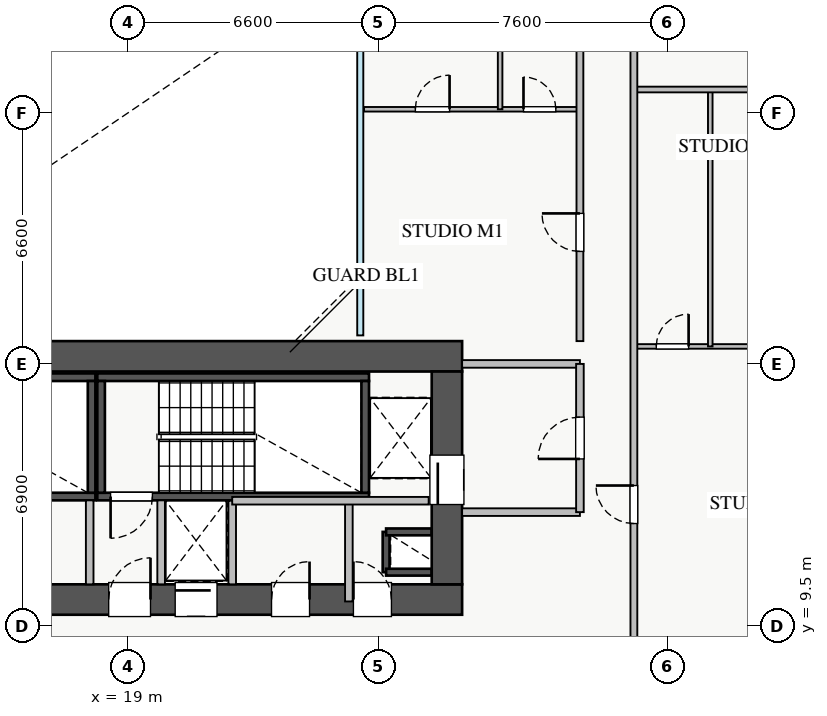
"""IFC4 building model, lengths in metres.
Left out: names, types, materials, properties, quantities, classifications, styles, units other than length and angle.
Written with IfcOpenShell. Run it as: python <this file> out.ifc"""

import sys

from ifc_helpers import new_model, si_unit, direction, frame, frame_2d, origin, place, context, subcontext, project, spatial, rectangle, extrude, source, transform, mapped, element, fill, save


model = new_model("IFC4")
c1 = context("Model", 3, precision=1e-05, world=origin(), true_north=direction((0.0, 1.0)))
c2 = subcontext(c1, "Body", "Model", "MODEL_VIEW")
j1 = project(units=[si_unit("LENGTHUNIT", "METRE"), si_unit("PLANEANGLEUNIT", "RADIAN")], contexts=[c1])
p1 = place(None, origin())
s1 = spatial("IfcSite", under=j1, at=p1, CompositionType="ELEMENT")
p2 = place(p1, origin())
s2 = spatial("IfcBuilding", under=s1, at=p2, CompositionType="ELEMENT")
p3 = place(p2, frame((0.0, 0.0, 69.75)))
s3 = spatial("IfcBuildingStorey", under=s2, at=p3, CompositionType="ELEMENT", Elevation=69.75)
p4 = place(p3, frame((25.8, 10.92, 0.0), z_axis=(0.0, 0.0, 1.0), x_axis=(0.0, 1.0, 0.0)))
e1 = element("IfcWall", 1, at=p4, inside=s3, PredefinedType="SHEAR", context=c2, shape_type="SweptSolid", body=[
    extrude(rectangle(XDim=1.06, YDim=0.18, at=frame_2d((0.53, 0.0))), origin(), (0.0, 0.0, 1.0), 3.07),
])
for number, where, z_axis, x_axis in (
    (2, (25.8, 11.98, 0.0), (0.0, 0.0, 1.0), (1.0, 0.0, 0.0)),
    (3, (25.8, 10.92, 0.0), (0.0, 0.0, 1.0), (1.0, 0.0, 0.0)),
):
    element("IfcWall", number, at=place(p3, frame(where, z_axis=z_axis, x_axis=x_axis)), inside=s3, PredefinedType="SHEAR", context=c2, shape_type="SweptSolid", body=[
        extrude(rectangle(XDim=1.2, YDim=0.18, at=frame_2d((0.6, 0.0))), origin(), (0.0, 0.0, 1.0), 3.07),
    ])
p5 = place(p3, frame((19.88, 12.8, 0.0), z_axis=(0.0, 0.0, 1.0), x_axis=(1.0, 0.0, 0.0)))
e4 = element("IfcWall", 4, at=p5, inside=s3, PredefinedType="SHEAR", context=c2, shape_type="SweptSolid", body=[
    extrude(rectangle(XDim=1.87, YDim=0.18, at=frame_2d((0.935, 0.0))), origin(), (0.0, 0.0, 1.0), 3.07),
])
p6 = place(p3, frame((11.0, 12.91, 0.0), z_axis=(0.0, 0.0, 1.0), x_axis=(1.0, 0.0, 0.0)))
e5 = element("IfcWall", 5, at=p6, inside=s3, PredefinedType="SHEAR", context=c2, shape_type="SweptSolid", body=[
    extrude(rectangle(XDim=7.15, YDim=0.2, at=frame_2d((3.575, 0.0))), origin(), (0.0, 0.0, 1.0), 3.25),
])
p7 = place(p6, frame((0.35, 0.0, 0.0)))
e6 = element("IfcOpeningElement", 6, at=p7, cuts=e5, PredefinedType="OPENING", context=c2, shape_type="SweptSolid", body=[
    extrude(rectangle(XDim=1.1, YDim=2.05, at=frame_2d((0.55, 1.025))), frame((0.0, 0.11, 0.0), z_axis=(0.0, -1.0, 0.0), x_axis=(1.0, 0.0, 0.0)), (0.0, 0.0, 1.0), 0.22),
])
p8 = place(p3, frame((11.0, 16.05, 0.0), z_axis=(0.0, 0.0, 1.0), x_axis=(1.0, 0.0, 0.0)))
e7 = element("IfcWall", 7, at=p8, inside=s3, PredefinedType="SHEAR", context=c2, shape_type="SweptSolid", body=[
    extrude(rectangle(XDim=7.15, YDim=0.2, at=frame_2d((3.575, 0.0))), origin(), (0.0, 0.0, 1.0), 3.25),
])
p9 = place(p3, frame((18.05, 13.01, 0.0), z_axis=(0.0, 0.0, 1.0), x_axis=(0.0, 1.0, 0.0)))
e8 = element("IfcWall", 8, at=p9, inside=s3, PredefinedType="SHEAR", context=c2, shape_type="SweptSolid", body=[
    extrude(rectangle(XDim=2.94, YDim=0.2, at=frame_2d((1.47, 0.0))), origin(), (0.0, 0.0, 1.0), 3.25),
])
p10 = place(p3, frame((18.2, 12.91, 0.0), z_axis=(0.0, 0.0, 1.0), x_axis=(1.0, 0.0, 0.0)))
e9 = element("IfcWall", 9, at=p10, inside=s3, PredefinedType="SHEAR", context=c2, shape_type="SweptSolid", body=[
    extrude(rectangle(XDim=7.15, YDim=0.2, at=frame_2d((3.575, 0.0))), origin(), (0.0, 0.0, 1.0), 3.25),
])
p11 = place(p10, frame((0.35, 0.0, 0.0)))
e10 = element("IfcOpeningElement", 10, at=p11, cuts=e9, PredefinedType="OPENING", context=c2, shape_type="SweptSolid", body=[
    extrude(rectangle(XDim=1.1, YDim=2.05, at=frame_2d((0.55, 1.025))), frame((0.0, 0.11, 0.0), z_axis=(0.0, -1.0, 0.0), x_axis=(1.0, 0.0, 0.0)), (0.0, 0.0, 1.0), 0.22),
])
p12 = place(p3, frame((18.2, 16.05, 0.0), z_axis=(0.0, 0.0, 1.0), x_axis=(1.0, 0.0, 0.0)))
e11 = element("IfcWall", 11, at=p12, inside=s3, PredefinedType="SHEAR", context=c2, shape_type="SweptSolid", body=[
    extrude(rectangle(XDim=7.15, YDim=0.2, at=frame_2d((3.575, 0.0))), origin(), (0.0, 0.0, 1.0), 3.25),
])
for number, where, z_axis, x_axis in (
    (12, (18.3, 13.01, 0.0), (0.0, 0.0, 1.0), (0.0, 1.0, 0.0)),
    (13, (25.25, 13.01, 0.0), (0.0, 0.0, 1.0), (0.0, 1.0, 0.0)),
):
    element("IfcWall", number, at=place(p3, frame(where, z_axis=z_axis, x_axis=x_axis)), inside=s3, PredefinedType="SHEAR", context=c2, shape_type="SweptSolid", body=[
        extrude(rectangle(XDim=2.94, YDim=0.2, at=frame_2d((1.47, 0.0))), origin(), (0.0, 0.0, 1.0), 3.25),
    ])
p13 = place(p3, frame((10.2, 10.2, 0.0), z_axis=(0.0, 0.0, 1.0), x_axis=(1.0, 0.0, 0.0)))
e14 = element("IfcWall", 14, at=p13, inside=s3, PredefinedType="SHEAR", context=c2, shape_type="SweptSolid", body=[
    extrude(rectangle(XDim=17.6, YDim=0.8, at=frame_2d((8.8, 0.0))), origin(), (0.0, 0.0, 1.0), 3.25),
])
p14 = place(p13, frame((1.15, 0.0, 0.0)))
e15 = element("IfcOpeningElement", 15, at=p14, cuts=e14, PredefinedType="OPENING", context=c2, shape_type="SweptSolid", body=[
    extrude(rectangle(XDim=1.1, YDim=2.05, at=frame_2d((0.55, 1.025))), frame((0.0, 0.41, 0.0), z_axis=(0.0, -1.0, 0.0), x_axis=(1.0, 0.0, 0.0)), (0.0, 0.0, 1.0), 0.82),
])
p15 = place(p13, frame((8.3, 0.0, 0.0)))
e16 = element("IfcOpeningElement", 16, at=p15, cuts=e14, PredefinedType="OPENING", context=c2, shape_type="SweptSolid", body=[
    extrude(rectangle(XDim=1.1, YDim=2.05, at=frame_2d((0.55, 1.025))), frame((0.0, 0.41, 0.0), z_axis=(0.0, -1.0, 0.0), x_axis=(1.0, 0.0, 0.0)), (0.0, 0.0, 1.0), 0.82),
])
p16 = place(p13, frame((10.05, 0.0, 0.0)))
e17 = element("IfcOpeningElement", 17, at=p16, cuts=e14, PredefinedType="OPENING", context=c2, shape_type="SweptSolid", body=[
    extrude(rectangle(XDim=1.1, YDim=2.05, at=frame_2d((0.55, 1.025))), frame((0.0, 0.41, 0.0), z_axis=(0.0, -1.0, 0.0), x_axis=(1.0, 0.0, 0.0)), (0.0, 0.0, 1.0), 0.82),
])
p17 = place(p13, frame((14.74, 0.0, 0.0)))
e18 = element("IfcOpeningElement", 18, at=p17, cuts=e14, PredefinedType="OPENING", context=c2, shape_type="SweptSolid", body=[
    extrude(rectangle(XDim=1.0, YDim=2.05, at=frame_2d((0.5, 1.025))), frame((0.0, 0.41, 0.0), z_axis=(0.0, -1.0, 0.0), x_axis=(1.0, 0.0, 0.0)), (0.0, 0.0, 1.0), 0.82),
])
p18 = place(p13, frame((12.585, 0.0, 0.0)))
e19 = element("IfcOpeningElement", 19, at=p18, cuts=e14, PredefinedType="OPENING", context=c2, shape_type="SweptSolid", body=[
    extrude(rectangle(XDim=1.0, YDim=2.05, at=frame_2d((0.5, 1.025))), frame((0.0, 0.41, 0.0), z_axis=(0.0, -1.0, 0.0), x_axis=(1.0, 0.0, 0.0)), (0.0, 0.0, 1.0), 0.82),
])
p19 = place(p3, frame((10.2, 16.6, 0.0), z_axis=(0.0, 0.0, 1.0), x_axis=(1.0, 0.0, 0.0)))
e20 = element("IfcWall", 20, at=p19, inside=s3, PredefinedType="SHEAR", context=c2, shape_type="SweptSolid", body=[
    extrude(rectangle(XDim=17.6, YDim=0.8, at=frame_2d((8.8, 0.0))), origin(), (0.0, 0.0, 1.0), 3.25),
])
p20 = place(p3, frame((27.4, 10.6, 0.0), z_axis=(0.0, 0.0, 1.0), x_axis=(0.0, 1.0, 0.0)))
e21 = element("IfcWall", 21, at=p20, inside=s3, PredefinedType="SHEAR", context=c2, shape_type="SweptSolid", body=[
    extrude(rectangle(XDim=5.6, YDim=0.8, at=frame_2d((2.8, 0.0))), origin(), (0.0, 0.0, 1.0), 3.25),
])
p21 = place(p20, frame((2.1, 0.0, 0.0)))
e22 = element("IfcOpeningElement", 22, at=p21, cuts=e21, PredefinedType="OPENING", context=c2, shape_type="SweptSolid", body=[
    extrude(rectangle(XDim=1.3, YDim=2.05, at=frame_2d((0.65, 1.025))), frame((0.0, 0.41, 0.0), z_axis=(0.0, -1.0, 0.0), x_axis=(1.0, 0.0, 0.0)), (0.0, 0.0, 1.0), 0.82),
])
for number, where, z_axis, x_axis in (
    (23, (27.8, 16.4, 0.0), (0.0, 0.0, 1.0), (1.0, 0.0, 0.0)),
    (24, (27.8, 12.5, 0.0), (0.0, 0.0, 1.0), (1.0, 0.0, 0.0)),
):
    element("IfcWall", number, at=place(p3, frame(where, z_axis=z_axis, x_axis=x_axis)), inside=s3, PredefinedType="PARTITIONING", context=c2, shape_type="SweptSolid", body=[
        extrude(rectangle(XDim=3.1, YDim=0.2, at=frame_2d((1.55, 0.0))), origin(), (0.0, 0.0, 1.0), 3.07),
    ])
p22 = place(p3, frame((30.9, 12.5, 0.0), z_axis=(0.0, 0.0, 1.0), x_axis=(0.0, 1.0, 0.0)))
e25 = element("IfcWall", 25, at=p22, inside=s3, PredefinedType="PARTITIONING", context=c2, shape_type="SweptSolid", body=[
    extrude(rectangle(XDim=3.9, YDim=0.2, at=frame_2d((1.95, 0.0))), origin(), (0.0, 0.0, 1.0), 3.07),
])
p23 = place(p22, frame((1.4, 0.0, 0.0)))
e26 = element("IfcOpeningElement", 26, at=p23, cuts=e25, PredefinedType="OPENING", context=c2, shape_type="SweptSolid", body=[
    extrude(rectangle(XDim=1.1, YDim=2.05, at=frame_2d((0.55, 1.025))), frame((0.0, 0.11, 0.0), z_axis=(0.0, -1.0, 0.0), x_axis=(1.0, 0.0, 0.0)), (0.0, 0.0, 1.0), 0.22),
])
for number, where, z_axis, x_axis in (
    (27, (18.0, 10.6, 0.0), (0.0, 0.0, 1.0), (0.0, 1.0, 0.0)),
    (28, (19.88, 10.6, 0.0), (0.0, 0.0, 1.0), (0.0, 1.0, 0.0)),
):
    element("IfcWall", number, at=place(p3, frame(where, z_axis=z_axis, x_axis=x_axis)), inside=s3, PredefinedType="PARTITIONING", context=c2, shape_type="SweptSolid", body=[
        extrude(rectangle(XDim=2.21, YDim=0.2, at=frame_2d((1.105, 0.0))), origin(), (0.0, 0.0, 1.0), 3.07),
    ])
p24 = place(p3, frame((24.82, 10.15, 0.0), z_axis=(0.0, 0.0, 1.0), x_axis=(0.0, 1.0, 0.0)))
e29 = element("IfcWall", 29, at=p24, inside=s3, PredefinedType="PARTITIONING", context=c2, shape_type="SweptSolid", body=[
    extrude(rectangle(XDim=2.65, YDim=0.2, at=frame_2d((1.325, 0.0))), origin(), (0.0, 0.0, 1.0), 3.07),
])
p25 = place(p3, frame((21.75, 10.6, 0.0), z_axis=(0.0, 0.0, 1.0), x_axis=(0.0, 1.0, 0.0)))
e30 = element("IfcWall", 30, at=p25, inside=s3, PredefinedType="PARTITIONING", context=c2, shape_type="SweptSolid", body=[
    extrude(rectangle(XDim=2.2, YDim=0.2, at=frame_2d((1.1, 0.0))), origin(), (0.0, 0.0, 1.0), 3.07),
])
p26 = place(p3, frame((21.75, 12.8, 0.0), z_axis=(0.0, 0.0, 1.0), x_axis=(1.0, 0.0, 0.0)))
e31 = element("IfcWall", 31, at=p26, inside=s3, PredefinedType="PARTITIONING", context=c2, shape_type="SweptSolid", body=[
    extrude(rectangle(XDim=5.17, YDim=0.2, at=frame_2d((2.585, 0.0))), origin(), (0.0, 0.0, 1.0), 3.07),
])
p27 = place(p3, frame((32.32, 16.86, 0.0), z_axis=(0.0, 0.0, 1.0), x_axis=(1.0, 0.0, 0.0)))
e32 = element("IfcWall", 32, at=p27, inside=s3, PredefinedType="PLUMBINGWALL", context=c2, shape_type="SweptSolid", body=[
    extrude(rectangle(XDim=5.43, YDim=0.12, at=frame_2d((2.715, 0.0))), origin(), (0.0, 0.0, 1.0), 3.07),
])
p28 = place(p27, frame((0.59, 0.0, 0.0)))
e33 = element("IfcOpeningElement", 33, at=p28, cuts=e32, PredefinedType="OPENING", context=c2, shape_type="SweptSolid", body=[
    extrude(rectangle(XDim=0.85, YDim=2.05, at=frame_2d((0.425, 1.025))), frame((0.0, 0.07, 0.0), z_axis=(0.0, -1.0, 0.0), x_axis=(1.0, 0.0, 0.0)), (0.0, 0.0, 1.0), 0.14),
])
p29 = place(p27, frame((3.26, 0.0, 0.0)))
e34 = element("IfcOpeningElement", 34, at=p29, cuts=e32, PredefinedType="OPENING", context=c2, shape_type="SweptSolid", body=[
    extrude(rectangle(XDim=0.9, YDim=2.05, at=frame_2d((0.45, 1.025))), frame((0.0, 0.07, 0.0), z_axis=(0.0, -1.0, 0.0), x_axis=(1.0, 0.0, 0.0)), (0.0, 0.0, 1.0), 0.14),
])
p30 = place(p3, frame((34.33, 16.86, 0.0), z_axis=(0.0, 0.0, 1.0), x_axis=(0.0, 1.0, 0.0)))
e35 = element("IfcWall", 35, at=p30, inside=s3, PredefinedType="PLUMBINGWALL", context=c2, shape_type="SweptSolid", body=[
    extrude(rectangle(XDim=6.76, YDim=0.12, at=frame_2d((3.38, 0.0))), origin(), (0.0, 0.0, 1.0), 3.07),
])
p31 = place(p3, frame((32.32, 23.62, 0.0), z_axis=(0.0, 0.0, 1.0), x_axis=(1.0, 0.0, 0.0)))
e36 = element("IfcWall", 36, at=p31, inside=s3, PredefinedType="PARTITIONING", context=c2, shape_type="SweptSolid", body=[
    extrude(rectangle(XDim=5.43, YDim=0.15, at=frame_2d((2.715, 0.0))), origin(), (0.0, 0.0, 1.0), 3.07),
])
p32 = place(p3, frame((32.32, 7.21, 0.0), z_axis=(0.0, 0.0, 1.0), x_axis=(0.0, 1.0, 0.0)))
e37 = element("IfcWall", 37, at=p32, inside=s3, PredefinedType="PARTITIONING", context=c2, shape_type="SweptSolid", body=[
    extrude(rectangle(XDim=31.23, YDim=0.18, at=frame_2d((15.615, 0.0))), origin(), (0.0, 0.0, 1.0), 2.765),
])
p33 = place(p32, frame((30.09, 0.0, 0.0)))
e38 = element("IfcOpeningElement", 38, at=p33, cuts=e37, PredefinedType="OPENING", context=c2, shape_type="SweptSolid", body=[
    extrude(rectangle(XDim=0.9, YDim=2.05, at=frame_2d((0.45, 1.025))), frame((0.0, 0.1, 0.0), z_axis=(0.0, -1.0, 0.0), x_axis=(1.0, 0.0, 0.0)), (0.0, 0.0, 1.0), 0.2),
])
p34 = place(p32, frame((0.415, 0.0, 0.0)))
e39 = element("IfcOpeningElement", 39, at=p34, cuts=e37, PredefinedType="OPENING", context=c2, shape_type="SweptSolid", body=[
    extrude(rectangle(XDim=0.9, YDim=2.05, at=frame_2d((0.45, 1.025))), frame((0.0, 0.1, 0.0), z_axis=(0.0, -1.0, 0.0), x_axis=(1.0, 0.0, 0.0)), (0.0, 0.0, 1.0), 0.2),
])
p35 = place(p32, frame((4.99, 0.0, 0.0)))
e40 = element("IfcOpeningElement", 40, at=p35, cuts=e37, PredefinedType="OPENING", context=c2, shape_type="SweptSolid", body=[
    extrude(rectangle(XDim=1.0, YDim=2.05, at=frame_2d((0.5, 1.025))), frame((0.0, 0.1, 0.0), z_axis=(0.0, -1.0, 0.0), x_axis=(1.0, 0.0, 0.0)), (0.0, 0.0, 1.0), 0.2),
])
p36 = place(p32, frame((19.355, 0.0, 0.0)))
e41 = element("IfcOpeningElement", 41, at=p36, cuts=e37, PredefinedType="OPENING", context=c2, shape_type="SweptSolid", body=[
    extrude(rectangle(XDim=1.0, YDim=2.05, at=frame_2d((0.5, 1.025))), frame((0.0, 0.1, 0.0), z_axis=(0.0, -1.0, 0.0), x_axis=(1.0, 0.0, 0.0)), (0.0, 0.0, 1.0), 0.2),
])
p37 = place(p3, frame((25.22, 23.1, 0.0), z_axis=(0.0, 0.0, 1.0), x_axis=(1.0, 0.0, 0.0)))
e42 = element("IfcWall", 42, at=p37, inside=s3, PredefinedType="PLUMBINGWALL", context=c2, shape_type="SweptSolid", body=[
    extrude(rectangle(XDim=5.68, YDim=0.12, at=frame_2d((2.84, 0.0))), origin(), (0.0, 0.0, 1.0), 3.07),
])
p38 = place(p37, frame((1.35, 0.0, 0.0)))
e43 = element("IfcOpeningElement", 43, at=p38, cuts=e42, PredefinedType="OPENING", context=c2, shape_type="SweptSolid", body=[
    extrude(rectangle(XDim=0.9, YDim=2.05, at=frame_2d((0.45, 1.025))), frame((0.0, 0.07, 0.0), z_axis=(0.0, -1.0, 0.0), x_axis=(1.0, 0.0, 0.0)), (0.0, 0.0, 1.0), 0.14),
])
p39 = place(p37, frame((4.195, 0.0, 0.0)))
e44 = element("IfcOpeningElement", 44, at=p39, cuts=e42, PredefinedType="OPENING", context=c2, shape_type="SweptSolid", body=[
    extrude(rectangle(XDim=0.85, YDim=2.05, at=frame_2d((0.425, 1.025))), frame((0.0, 0.07, 0.0), z_axis=(0.0, -1.0, 0.0), x_axis=(1.0, 0.0, 0.0)), (0.0, 0.0, 1.0), 0.14),
])
p40 = place(p3, frame((28.8, 23.1, 0.0), z_axis=(0.0, 0.0, 1.0), x_axis=(0.0, 1.0, 0.0)))
e45 = element("IfcWall", 45, at=p40, inside=s3, PredefinedType="PLUMBINGWALL", context=c2, shape_type="SweptSolid", body=[
    extrude(rectangle(XDim=5.9, YDim=0.12, at=frame_2d((2.95, 0.0))), origin(), (0.0, 0.0, 1.0), 3.07),
])
p41 = place(p3, frame((30.9, 17.0, 0.0), z_axis=(0.0, 0.0, 1.0), x_axis=(0.0, 1.0, 0.0)))
e46 = element("IfcWall", 46, at=p41, inside=s3, PredefinedType="PARTITIONING", context=c2, shape_type="SweptSolid", body=[
    extrude(rectangle(XDim=12.0, YDim=0.18, at=frame_2d((6.0, 0.0))), origin(), (0.0, 0.0, 1.0), 3.07),
])
p42 = place(p41, frame((2.36, 0.0, 0.0)))
e47 = element("IfcOpeningElement", 47, at=p42, cuts=e46, PredefinedType="OPENING", context=c2, shape_type="SweptSolid", body=[
    extrude(rectangle(XDim=1.0, YDim=2.05, at=frame_2d((0.5, 1.025))), frame((0.0, 0.1, 0.0), z_axis=(0.0, -1.0, 0.0), x_axis=(1.0, 0.0, 0.0)), (0.0, 0.0, 1.0), 0.2),
])
m1 = source(origin(), c2, "Body", "SweptSolid", [
    extrude(rectangle(XDim=1.3, YDim=2.05, at=frame_2d((0.65, 1.025))), frame((0.0, 0.025, 0.0), z_axis=(0.0, -1.0, 0.0), x_axis=(1.0, 0.0, 0.0)), (0.0, 0.0, 1.0), 0.05),
])
p43 = place(p21, origin())
e48 = element("IfcDoor", 48, at=p43, inside=s3, OperationType="SLIDING_TO_RIGHT", PredefinedType="DOOR", context=c2, shape_type="MappedRepresentation", body=[
    mapped(m1, transform((0.0, 0.0, 0.0), x_axis=(1.0, 0.0, 0.0), y_axis=(0.0, 1.0, 0.0), z_axis=(0.0, 0.0, 1.0), scale=1.0)),
])
fill(e22, e48)
m2 = source(origin(), c2, "Body", "SweptSolid", [
    extrude(rectangle(XDim=1.1, YDim=2.05, at=frame_2d((0.55, 1.025))), frame((0.0, 0.025, 0.0), z_axis=(0.0, -1.0, 0.0), x_axis=(1.0, 0.0, 0.0)), (0.0, 0.0, 1.0), 0.05),
])
p44 = place(p15, origin())
e49 = element("IfcDoor", 49, at=p44, inside=s3, OperationType="SINGLE_SWING_RIGHT", PredefinedType="DOOR", context=c2, shape_type="MappedRepresentation", body=[
    mapped(m2, transform((0.0, 0.0, 0.0), x_axis=(1.0, 0.0, 0.0), y_axis=(0.0, 1.0, 0.0), z_axis=(0.0, 0.0, 1.0), scale=1.0)),
])
fill(e16, e49)
p45 = place(p11, frame((1.1, 0.0, 0.0), z_axis=(0.0, 0.0, 1.0), x_axis=(-1.0, 0.0, 0.0)))
e50 = element("IfcDoor", 50, at=p45, inside=s3, OperationType="SINGLE_SWING_LEFT", PredefinedType="DOOR", context=c2, shape_type="MappedRepresentation", body=[
    mapped(m2, transform((0.0, 0.0, 0.0), x_axis=(1.0, 0.0, 0.0), y_axis=(0.0, 1.0, 0.0), z_axis=(0.0, 0.0, 1.0), scale=1.0)),
])
fill(e10, e50)
p46 = place(p16, origin())
e51 = element("IfcDoor", 51, at=p46, inside=s3, OperationType="SLIDING_TO_RIGHT", PredefinedType="DOOR", context=c2, shape_type="MappedRepresentation", body=[
    mapped(m2, transform((0.0, 0.0, 0.0), x_axis=(1.0, 0.0, 0.0), y_axis=(0.0, 1.0, 0.0), z_axis=(0.0, 0.0, 1.0), scale=1.0)),
])
fill(e17, e51)
m3 = source(origin(), c2, "Body", "SweptSolid", [
    extrude(rectangle(XDim=1.0, YDim=2.05, at=frame_2d((0.5, 1.025))), frame((0.0, 0.025, 0.0), z_axis=(0.0, -1.0, 0.0), x_axis=(1.0, 0.0, 0.0)), (0.0, 0.0, 1.0), 0.05),
])
p47 = place(p17, origin())
e52 = element("IfcDoor", 52, at=p47, inside=s3, OperationType="SINGLE_SWING_LEFT", PredefinedType="DOOR", context=c2, shape_type="MappedRepresentation", body=[
    mapped(m3, transform((0.0, 0.0, 0.0), x_axis=(1.0, 0.0, 0.0), y_axis=(0.0, 1.0, 0.0), z_axis=(0.0, 0.0, 1.0), scale=1.0)),
])
fill(e18, e52)
p48 = place(p18, origin())
e53 = element("IfcDoor", 53, at=p48, inside=s3, OperationType="SINGLE_SWING_RIGHT", PredefinedType="DOOR", context=c2, shape_type="MappedRepresentation", body=[
    mapped(m3, transform((0.0, 0.0, 0.0), x_axis=(1.0, 0.0, 0.0), y_axis=(0.0, 1.0, 0.0), z_axis=(0.0, 0.0, 1.0), scale=1.0)),
])
fill(e19, e53)
p49 = place(p23, origin())
e54 = element("IfcDoor", 54, at=p49, inside=s3, OperationType="SINGLE_SWING_LEFT", PredefinedType="DOOR", context=c2, shape_type="MappedRepresentation", body=[
    mapped(m2, transform((0.0, 0.0, 0.0), x_axis=(1.0, 0.0, 0.0), y_axis=(0.0, 1.0, 0.0), z_axis=(0.0, 0.0, 1.0), scale=1.0)),
])
fill(e26, e54)
m4 = source(origin(), c2, "Body", "SweptSolid", [
    extrude(rectangle(XDim=0.85, YDim=2.05, at=frame_2d((0.425, 1.025))), frame((0.0, 0.025, 0.0), z_axis=(0.0, -1.0, 0.0), x_axis=(1.0, 0.0, 0.0)), (0.0, 0.0, 1.0), 0.05),
])
p50 = place(p28, origin())
e55 = element("IfcDoor", 55, at=p50, inside=s3, OperationType="SINGLE_SWING_RIGHT", PredefinedType="DOOR", context=c2, shape_type="MappedRepresentation", body=[
    mapped(m4, transform((0.0, 0.0, 0.0), x_axis=(1.0, 0.0, 0.0), y_axis=(0.0, 1.0, 0.0), z_axis=(0.0, 0.0, 1.0), scale=1.0)),
])
fill(e33, e55)
p51 = place(p35, origin())
e56 = element("IfcDoor", 56, at=p51, inside=s3, OperationType="SINGLE_SWING_RIGHT", PredefinedType="DOOR", context=c2, shape_type="MappedRepresentation", body=[
    mapped(m3, transform((0.0, 0.0, 0.0), x_axis=(1.0, 0.0, 0.0), y_axis=(0.0, 1.0, 0.0), z_axis=(0.0, 0.0, 1.0), scale=1.0)),
])
fill(e40, e56)
m5 = source(origin(), c2, "Body", "SweptSolid", [
    extrude(rectangle(XDim=0.9, YDim=2.05, at=frame_2d((0.45, 1.025))), frame((0.0, 0.025, 0.0), z_axis=(0.0, -1.0, 0.0), x_axis=(1.0, 0.0, 0.0)), (0.0, 0.0, 1.0), 0.05),
])
p52 = place(p38, origin())
e57 = element("IfcDoor", 57, at=p52, inside=s3, OperationType="SINGLE_SWING_RIGHT", PredefinedType="DOOR", context=c2, shape_type="MappedRepresentation", body=[
    mapped(m5, transform((0.0, 0.0, 0.0), x_axis=(1.0, 0.0, 0.0), y_axis=(0.0, 1.0, 0.0), z_axis=(0.0, 0.0, 1.0), scale=1.0)),
])
fill(e43, e57)
p53 = place(p39, origin())
e58 = element("IfcDoor", 58, at=p53, inside=s3, OperationType="SINGLE_SWING_LEFT", PredefinedType="DOOR", context=c2, shape_type="MappedRepresentation", body=[
    mapped(m4, transform((0.0, 0.0, 0.0), x_axis=(1.0, 0.0, 0.0), y_axis=(0.0, 1.0, 0.0), z_axis=(0.0, 0.0, 1.0), scale=1.0)),
])
fill(e44, e58)
p54 = place(p42, origin())
e59 = element("IfcDoor", 59, at=p54, inside=s3, OperationType="SINGLE_SWING_RIGHT", PredefinedType="DOOR", context=c2, shape_type="MappedRepresentation", body=[
    mapped(m3, transform((0.0, 0.0, 0.0), x_axis=(1.0, 0.0, 0.0), y_axis=(0.0, 1.0, 0.0), z_axis=(0.0, 0.0, 1.0), scale=1.0)),
])
fill(e47, e59)
save(model, sys.argv[1])
